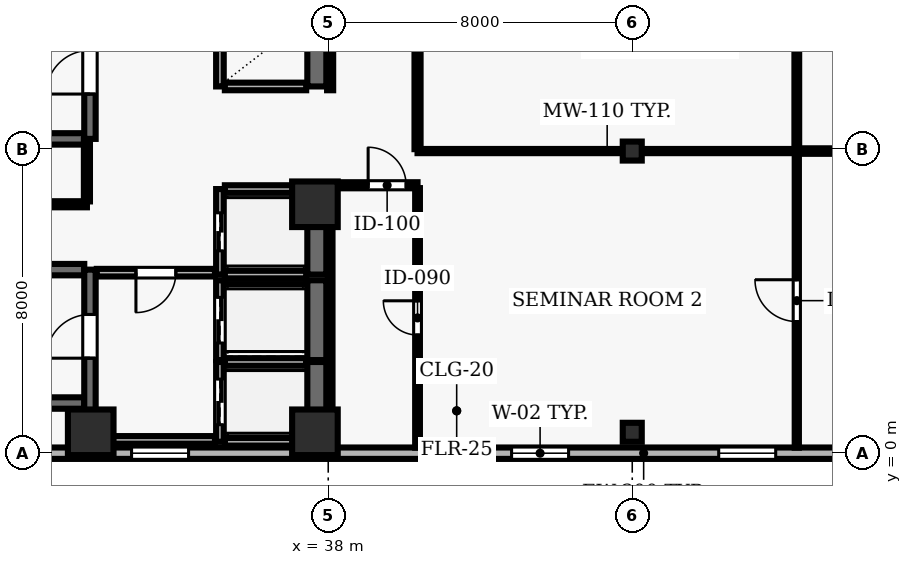
"""IFC4 building model, lengths in metres.
Left out: names, types, materials, properties, quantities, classifications, styles, units other than length and angle.
Written with IfcOpenShell. Run it as: python <this file> out.ifc"""

import sys

from ifc_helpers import new_model, si_unit, direction, frame, frame_2d, origin, origin_2d, place, context, subcontext, project, spatial, rectangle, hollow_rectangle, extrude, element, fill, save


model = new_model("IFC4")
c1 = context("Model", 3, precision=1e-05, world=origin(), true_north=direction((0.0, 1.0)))
c2 = subcontext(c1, "Body", "Model", "MODEL_VIEW")
j1 = project(units=[si_unit("LENGTHUNIT", "METRE"), si_unit("PLANEANGLEUNIT", "RADIAN")], contexts=[c1])
p1 = place(None, origin())
s1 = spatial("IfcSite", under=j1, at=p1, CompositionType="ELEMENT")
p2 = place(p1, origin())
s2 = spatial("IfcBuilding", under=s1, at=p2, CompositionType="ELEMENT")
p3 = place(p2, frame((0.0, 0.0, 107.3)))
s3 = spatial("IfcBuildingStorey", under=s2, at=p3, CompositionType="ELEMENT", Elevation=107.3)
for number, where, z_axis, x_axis in (
    (1, (31.75, 0.55, 0.0), (0.0, 0.0, 1.0), (1.0, 0.0, 0.0)),
    (2, (37.65, 0.55, 0.0), (0.0, 0.0, 1.0), (1.0, 0.0, 0.0)),
    (3, (37.65, 6.55, 0.0), (0.0, 0.0, 1.0), (1.0, 0.0, 0.0)),
):
    element("IfcColumn", number, at=place(p3, frame(where, z_axis=z_axis, x_axis=x_axis)), inside=s3, PredefinedType="COLUMN", context=c2, shape_type="SweptSolid", body=[
        extrude(rectangle(XDim=1.2, YDim=1.2, at=origin_2d()), origin(), (0.0, 0.0, 1.0), 3.9),
    ])
for number, where, z_axis, x_axis in (
    (4, (46.0, 0.55, 0.0), (0.0, 0.0, 1.0), (1.0, 0.0, 0.0)),
    (5, (46.0, 7.95, 0.0), (0.0, 0.0, 1.0), (1.0, 0.0, 0.0)),
):
    element("IfcColumn", number, at=place(p3, frame(where, z_axis=z_axis, x_axis=x_axis)), inside=s3, PredefinedType="COLUMN", context=c2, shape_type="SweptSolid", body=[
        extrude(hollow_rectangle(XDim=0.5, YDim=0.5, WallThickness=0.025, at=origin_2d()), origin(), (0.0, 0.0, 1.0), 3.9),
    ])
p4 = place(p3, frame((24.5, 0.0, 0.0), z_axis=(0.0, 0.0, 1.0), x_axis=(1.0, 0.0, 0.0)))
e6 = element("IfcWall", 6, at=p4, inside=s3, PredefinedType="SOLIDWALL", context=c2, shape_type="SweptSolid", body=[
    extrude(rectangle(XDim=43.6, YDim=0.3, at=frame_2d((21.8, 0.0))), origin(), (0.0, 0.0, 1.0), 3.69),
])
p5 = place(p4, frame((1.975, 0.0, 0.9)))
e7 = element("IfcOpeningElement", 7, at=p5, cuts=e6, PredefinedType="OPENING", context=c2, shape_type="SweptSolid", body=[
    extrude(rectangle(XDim=1.5, YDim=1.6, at=frame_2d((0.75, 0.8))), frame((0.0, 0.16, 0.0), z_axis=(0.0, -1.0, 0.0), x_axis=(1.0, 0.0, 0.0)), (0.0, 0.0, 1.0), 0.32),
])
p6 = place(p4, frame((8.325, 0.0, 0.9)))
e8 = element("IfcOpeningElement", 8, at=p6, cuts=e6, PredefinedType="OPENING", context=c2, shape_type="SweptSolid", body=[
    extrude(rectangle(XDim=1.5, YDim=1.6, at=frame_2d((0.75, 0.8))), frame((0.0, 0.16, 0.0), z_axis=(0.0, -1.0, 0.0), x_axis=(1.0, 0.0, 0.0)), (0.0, 0.0, 1.0), 0.32),
])
p7 = place(p4, frame((18.325, 0.0, 0.9)))
e9 = element("IfcOpeningElement", 9, at=p7, cuts=e6, PredefinedType="OPENING", context=c2, shape_type="SweptSolid", body=[
    extrude(rectangle(XDim=1.5, YDim=1.6, at=frame_2d((0.75, 0.8))), frame((0.0, 0.16, 0.0), z_axis=(0.0, -1.0, 0.0), x_axis=(1.0, 0.0, 0.0)), (0.0, 0.0, 1.0), 0.32),
])
p8 = place(p4, frame((23.775, 0.0, 0.9)))
e10 = element("IfcOpeningElement", 10, at=p8, cuts=e6, PredefinedType="OPENING", context=c2, shape_type="SweptSolid", body=[
    extrude(rectangle(XDim=1.5, YDim=1.6, at=frame_2d((0.75, 0.8))), frame((0.0, 0.16, 0.0), z_axis=(0.0, -1.0, 0.0), x_axis=(1.0, 0.0, 0.0)), (0.0, 0.0, 1.0), 0.32),
])
p9 = place(p4, frame((29.225, 0.0, 0.9)))
e11 = element("IfcOpeningElement", 11, at=p9, cuts=e6, PredefinedType="OPENING", context=c2, shape_type="SweptSolid", body=[
    extrude(rectangle(XDim=1.5, YDim=1.6, at=frame_2d((0.75, 0.8))), frame((0.0, 0.16, 0.0), z_axis=(0.0, -1.0, 0.0), x_axis=(1.0, 0.0, 0.0)), (0.0, 0.0, 1.0), 0.32),
])
p10 = place(p4, frame((40.125, 0.0, 0.9)))
e12 = element("IfcOpeningElement", 12, at=p10, cuts=e6, PredefinedType="OPENING", context=c2, shape_type="SweptSolid", body=[
    extrude(rectangle(XDim=1.5, YDim=1.6, at=frame_2d((0.75, 0.8))), frame((0.0, 0.16, 0.0), z_axis=(0.0, -1.0, 0.0), x_axis=(1.0, 0.0, 0.0)), (0.0, 0.0, 1.0), 0.32),
])
for number, where, z_axis, x_axis in (
    (13, (31.58, 4.83, 0.0), (0.0, 0.0, 1.0), (-1.0, 0.0, 0.0)),
    (14, (23.22, 1.32, 0.0), (0.0, 0.0, 1.0), (1.0, 0.0, 0.0)),
):
    element("IfcWall", number, at=place(p3, frame(where, z_axis=z_axis, x_axis=x_axis)), inside=s3, PredefinedType="SHEAR", context=c2, shape_type="SweptSolid", body=[
        extrude(rectangle(XDim=8.36, YDim=0.3, at=frame_2d((4.18, 0.0))), origin(), (0.0, 0.0, 1.0), 3.69),
    ])
p11 = place(p3, frame((31.73, 0.96, 0.0), z_axis=(0.0, 0.0, 1.0), x_axis=(0.0, 1.0, 0.0)))
e15 = element("IfcWall", 15, at=p11, inside=s3, PredefinedType="SHEAR", context=c2, shape_type="SweptSolid", body=[
    extrude(rectangle(XDim=3.87, YDim=0.3, at=frame_2d((1.935, 0.0))), origin(), (0.0, 0.0, 1.0), 3.69),
])
p12 = place(p11, frame((1.54, 0.0, 0.0)))
e16 = element("IfcOpeningElement", 16, at=p12, cuts=e15, PredefinedType="OPENING", context=c2, shape_type="SweptSolid", body=[
    extrude(rectangle(XDim=1.15, YDim=2.15, at=frame_2d((0.575, 1.075))), frame((0.0, 0.16, 0.0), z_axis=(0.0, -1.0, 0.0), x_axis=(1.0, 0.0, 0.0)), (0.0, 0.0, 1.0), 0.32),
])
p13 = place(p3, frame((23.22, 8.27, 0.0), z_axis=(0.0, 0.0, 1.0), x_axis=(1.0, 0.0, 0.0)))
e17 = element("IfcWall", 17, at=p13, inside=s3, PredefinedType="SHEAR", context=c2, shape_type="SweptSolid", body=[
    extrude(rectangle(XDim=8.36, YDim=0.3, at=frame_2d((4.18, 0.0))), origin(), (0.0, 0.0, 1.0), 3.69),
])
p14 = place(p3, frame((31.73, 8.27, 0.0), z_axis=(0.0, 0.0, 1.0), x_axis=(0.0, 1.0, 0.0)))
e18 = element("IfcWall", 18, at=p14, inside=s3, PredefinedType="SHEAR", context=c2, shape_type="SweptSolid", body=[
    extrude(rectangle(XDim=3.51, YDim=0.3, at=frame_2d((1.755, 0.0))), origin(), (0.0, 0.0, 1.0), 3.69),
])
p15 = place(p14, frame((1.18, 0.0, 0.0)))
e19 = element("IfcOpeningElement", 19, at=p15, cuts=e18, PredefinedType="OPENING", context=c2, shape_type="SweptSolid", body=[
    extrude(rectangle(XDim=1.15, YDim=2.15, at=frame_2d((0.575, 1.075))), frame((0.0, 0.16, 0.0), z_axis=(0.0, -1.0, 0.0), x_axis=(1.0, 0.0, 0.0)), (0.0, 0.0, 1.0), 0.32),
])
p16 = place(p3, frame((35.15, 2.4, 0.0), z_axis=(0.0, 0.0, 1.0), x_axis=(0.0, -1.0, 0.0)))
e20 = element("IfcWall", 20, at=p16, inside=s3, PredefinedType="SOLIDWALL", context=c2, shape_type="SweptSolid", body=[
    extrude(rectangle(XDim=2.1, YDim=0.2, at=frame_2d((1.05, 0.0))), origin(), (0.0, 0.0, 1.0), 3.69),
])
p17 = place(p16, frame((0.45, 0.0, 0.0)))
e21 = element("IfcOpeningElement", 21, at=p17, cuts=e20, PredefinedType="OPENING", context=c2, shape_type="SweptSolid", body=[
    extrude(rectangle(XDim=1.2, YDim=2.15, at=frame_2d((0.6, 1.075))), frame((0.0, 0.11, 0.0), z_axis=(0.0, -1.0, 0.0), x_axis=(1.0, 0.0, 0.0)), (0.0, 0.0, 1.0), 0.22),
])
p18 = place(p3, frame((37.7, 0.3, 0.0), z_axis=(0.0, 0.0, 1.0), x_axis=(0.0, 1.0, 0.0)))
e22 = element("IfcWall", 22, at=p18, inside=s3, PredefinedType="SHEAR", context=c2, shape_type="SweptSolid", body=[
    extrude(rectangle(XDim=2.1, YDim=0.5, at=frame_2d((1.05, 0.0))), origin(), (0.0, 0.0, 1.0), 3.69),
])
for number, where, z_axis, x_axis in (
    (23, (35.28, 0.3, 0.0), (0.0, 0.0, 1.0), (1.0, 0.0, 0.0)),
    (24, (37.42, 2.4, 0.0), (0.0, 0.0, 1.0), (-1.0, 0.0, 0.0)),
):
    element("IfcWall", number, at=place(p3, frame(where, z_axis=z_axis, x_axis=x_axis)), inside=s3, PredefinedType="SOLIDWALL", context=c2, shape_type="SweptSolid", body=[
        extrude(rectangle(XDim=2.14, YDim=0.2, at=frame_2d((1.07, 0.0))), origin(), (0.0, 0.0, 1.0), 3.69),
    ])
p19 = place(p3, frame((35.15, 4.55, 0.0), z_axis=(0.0, 0.0, 1.0), x_axis=(0.0, -1.0, 0.0)))
e25 = element("IfcWall", 25, at=p19, inside=s3, PredefinedType="SOLIDWALL", context=c2, shape_type="SweptSolid", body=[
    extrude(rectangle(XDim=2.1, YDim=0.2, at=frame_2d((1.05, 0.0))), origin(), (0.0, 0.0, 1.0), 3.69),
])
p20 = place(p19, frame((0.45, 0.0, 0.0)))
e26 = element("IfcOpeningElement", 26, at=p20, cuts=e25, PredefinedType="OPENING", context=c2, shape_type="SweptSolid", body=[
    extrude(rectangle(XDim=1.2, YDim=2.15, at=frame_2d((0.6, 1.075))), frame((0.0, 0.11, 0.0), z_axis=(0.0, -1.0, 0.0), x_axis=(1.0, 0.0, 0.0)), (0.0, 0.0, 1.0), 0.22),
])
p21 = place(p3, frame((37.7, 2.45, 0.0), z_axis=(0.0, 0.0, 1.0), x_axis=(0.0, 1.0, 0.0)))
e27 = element("IfcWall", 27, at=p21, inside=s3, PredefinedType="SHEAR", context=c2, shape_type="SweptSolid", body=[
    extrude(rectangle(XDim=2.1, YDim=0.5, at=frame_2d((1.05, 0.0))), origin(), (0.0, 0.0, 1.0), 3.69),
])
p22 = place(p3, frame((37.42, 4.55, 0.0), z_axis=(0.0, 0.0, 1.0), x_axis=(-1.0, 0.0, 0.0)))
e28 = element("IfcWall", 28, at=p22, inside=s3, PredefinedType="SOLIDWALL", context=c2, shape_type="SweptSolid", body=[
    extrude(rectangle(XDim=2.14, YDim=0.2, at=frame_2d((1.07, 0.0))), origin(), (0.0, 0.0, 1.0), 3.69),
])
p23 = place(p3, frame((35.15, 6.95, 0.0), z_axis=(0.0, 0.0, 1.0), x_axis=(0.0, -1.0, 0.0)))
e29 = element("IfcWall", 29, at=p23, inside=s3, PredefinedType="SOLIDWALL", context=c2, shape_type="SweptSolid", body=[
    extrude(rectangle(XDim=2.25, YDim=0.2, at=frame_2d((1.125, 0.0))), origin(), (0.0, 0.0, 1.0), 3.69),
])
p24 = place(p23, frame((0.625, 0.0, 0.0)))
e30 = element("IfcOpeningElement", 30, at=p24, cuts=e29, PredefinedType="OPENING", context=c2, shape_type="SweptSolid", body=[
    extrude(rectangle(XDim=1.0, YDim=2.1, at=frame_2d((0.5, 1.05))), frame((0.0, 0.11, 0.0), z_axis=(0.0, -1.0, 0.0), x_axis=(1.0, 0.0, 0.0)), (0.0, 0.0, 1.0), 0.22),
])
p25 = place(p3, frame((37.7, 4.7, 0.0), z_axis=(0.0, 0.0, 1.0), x_axis=(0.0, 1.0, 0.0)))
e31 = element("IfcWall", 31, at=p25, inside=s3, PredefinedType="SHEAR", context=c2, shape_type="SweptSolid", body=[
    extrude(rectangle(XDim=2.25, YDim=0.5, at=frame_2d((1.125, 0.0))), origin(), (0.0, 0.0, 1.0), 3.69),
])
for number, where, z_axis, x_axis in (
    (32, (35.28, 4.7, 0.0), (0.0, 0.0, 1.0), (1.0, 0.0, 0.0)),
    (33, (37.42, 6.95, 0.0), (0.0, 0.0, 1.0), (-1.0, 0.0, 0.0)),
):
    element("IfcWall", number, at=place(p3, frame(where, z_axis=z_axis, x_axis=x_axis)), inside=s3, PredefinedType="SOLIDWALL", context=c2, shape_type="SweptSolid", body=[
        extrude(rectangle(XDim=2.14, YDim=0.2, at=frame_2d((1.07, 0.0))), origin(), (0.0, 0.0, 1.0), 3.69),
    ])
p26 = place(p3, frame((35.15, 11.55, 0.0), z_axis=(0.0, 0.0, 1.0), x_axis=(0.0, -1.0, 0.0)))
e34 = element("IfcWall", 34, at=p26, inside=s3, PredefinedType="SOLIDWALL", context=c2, shape_type="SweptSolid", body=[
    extrude(rectangle(XDim=1.9, YDim=0.2, at=frame_2d((0.95, 0.0))), origin(), (0.0, 0.0, 1.0), 3.69),
])
p27 = place(p3, frame((37.7, 9.65, 0.0), z_axis=(0.0, 0.0, 1.0), x_axis=(0.0, 1.0, 0.0)))
e35 = element("IfcWall", 35, at=p27, inside=s3, PredefinedType="SHEAR", context=c2, shape_type="SweptSolid", body=[
    extrude(rectangle(XDim=1.9, YDim=0.5, at=frame_2d((0.95, 0.0))), origin(), (0.0, 0.0, 1.0), 3.69),
])
p28 = place(p3, frame((35.28, 9.65, 0.0), z_axis=(0.0, 0.0, 1.0), x_axis=(1.0, 0.0, 0.0)))
e36 = element("IfcWall", 36, at=p28, inside=s3, PredefinedType="SOLIDWALL", context=c2, shape_type="SweptSolid", body=[
    extrude(rectangle(XDim=2.14, YDim=0.2, at=frame_2d((1.07, 0.0))), origin(), (0.0, 0.0, 1.0), 3.69),
])
p29 = place(p3, frame((31.65, 0.35, 0.0), z_axis=(0.0, 0.0, 1.0), x_axis=(1.0, 0.0, 0.0)))
e37 = element("IfcWall", 37, at=p29, inside=s3, PredefinedType="SOLIDWALL", context=c2, shape_type="SweptSolid", body=[
    extrude(rectangle(XDim=3.37, YDim=0.2, at=frame_2d((1.685, 0.0))), origin(), (0.0, 0.0, 1.0), 3.69),
])
p30 = place(p3, frame((31.65, 6.55, 0.0), z_axis=(0.0, 0.0, 1.0), x_axis=(-1.0, 0.0, 0.0)))
e38 = element("IfcWall", 38, at=p30, inside=s3, PredefinedType="PARTITIONING", context=c2, shape_type="SweptSolid", body=[
    extrude(rectangle(XDim=4.75, YDim=0.16, at=frame_2d((2.375, 0.0))), origin(), (0.0, 0.0, 1.0), 3.69),
])
p31 = place(p30, frame((1.935, 0.0, 0.0)))
e39 = element("IfcOpeningElement", 39, at=p31, cuts=e38, PredefinedType="OPENING", context=c2, shape_type="SweptSolid", body=[
    extrude(rectangle(XDim=0.88, YDim=2.1, at=frame_2d((0.44, 1.05))), frame((0.0, 0.09, 0.0), z_axis=(0.0, -1.0, 0.0), x_axis=(1.0, 0.0, 0.0)), (0.0, 0.0, 1.0), 0.18),
])
p32 = place(p3, frame((35.02, 4.75, 0.0), z_axis=(0.0, 0.0, 1.0), x_axis=(-1.0, 0.0, 0.0)))
e40 = element("IfcWall", 40, at=p32, inside=s3, PredefinedType="SOLIDWALL", context=c2, shape_type="SweptSolid", body=[
    extrude(rectangle(XDim=3.11, YDim=0.2, at=frame_2d((1.555, 0.0))), origin(), (0.0, 0.0, 1.0), 3.69),
])
p33 = place(p32, frame((1.03, 0.0, 0.0)))
e41 = element("IfcOpeningElement", 41, at=p33, cuts=e40, PredefinedType="OPENING", context=c2, shape_type="SweptSolid", body=[
    extrude(rectangle(XDim=1.05, YDim=2.15, at=frame_2d((0.525, 1.075))), frame((0.0, 0.11, 0.0), z_axis=(0.0, -1.0, 0.0), x_axis=(1.0, 0.0, 0.0)), (0.0, 0.0, 1.0), 0.22),
])
p34 = place(p3, frame((38.05, 7.05, 0.0), z_axis=(0.0, 0.0, 1.0), x_axis=(1.0, 0.0, 0.0)))
e42 = element("IfcWall", 42, at=p34, inside=s3, PredefinedType="PARTITIONING", context=c2, shape_type="SweptSolid", body=[
    extrude(rectangle(XDim=2.3, YDim=0.16, at=frame_2d((1.15, 0.0))), origin(), (0.0, 0.0, 1.0), 3.69),
])
p35 = place(p34, frame((1.0, 0.0, 0.0)))
e43 = element("IfcOpeningElement", 43, at=p35, cuts=e42, PredefinedType="OPENING", context=c2, shape_type="SweptSolid", body=[
    extrude(rectangle(XDim=1.0, YDim=2.1, at=frame_2d((0.5, 1.05))), frame((0.0, 0.09, 0.0), z_axis=(0.0, -1.0, 0.0), x_axis=(1.0, 0.0, 0.0)), (0.0, 0.0, 1.0), 0.18),
])
p36 = place(p3, frame((50.33, 7.95, 0.0), z_axis=(0.0, 0.0, 1.0), x_axis=(-1.0, 0.0, 0.0)))
e44 = element("IfcWall", 44, at=p36, inside=s3, PredefinedType="MOVABLE", context=c2, shape_type="SweptSolid", body=[
    extrude(rectangle(XDim=9.98, YDim=0.11, at=frame_2d((4.99, 0.0))), origin(), (0.0, 0.0, 1.0), 3.073),
])
p37 = place(p3, frame((60.62, 7.95, 0.0), z_axis=(0.0, 0.0, 1.0), x_axis=(-1.0, 0.0, 0.0)))
e45 = element("IfcWall", 45, at=p37, inside=s3, PredefinedType="PARTITIONING", context=c2, shape_type="SweptSolid", body=[
    extrude(rectangle(XDim=10.29, YDim=0.145, at=frame_2d((5.145, 0.0))), origin(), (0.0, 0.0, 1.0), 3.073),
])
p38 = place(p3, frame((31.65, 8.24, 0.0), z_axis=(0.0, 0.0, 1.0), x_axis=(0.0, -1.0, 0.0)))
e46 = element("IfcWall", 46, at=p38, inside=s3, PredefinedType="PARTITIONING", context=c2, shape_type="SweptSolid", body=[
    extrude(rectangle(XDim=1.615, YDim=0.16, at=frame_2d((0.808, 0.0))), origin(), (0.0, 0.0, 1.0), 3.69),
])
p39 = place(p3, frame((38.05, 6.975, 0.0), z_axis=(0.0, 0.0, 1.0), x_axis=(0.0, -1.0, 0.0)))
e47 = element("IfcWall", 47, at=p39, inside=s3, PredefinedType="PARTITIONING", context=c2, shape_type="SweptSolid", body=[
    extrude(rectangle(XDim=6.83, YDim=0.125, at=frame_2d((3.415, 0.0))), origin(), (0.0, 0.0, 1.0), 3.073),
])
p40 = place(p3, frame((38.05, 15.925, 0.0), z_axis=(0.0, 0.0, 1.0), x_axis=(0.0, -1.0, 0.0)))
e48 = element("IfcWall", 48, at=p40, inside=s3, PredefinedType="PARTITIONING", context=c2, shape_type="SweptSolid", body=[
    extrude(rectangle(XDim=6.375, YDim=0.16, at=frame_2d((3.188, 0.0))), origin(), (0.0, 0.0, 1.0), 3.073),
])
p41 = place(p3, frame((40.35, 0.145, 0.0), z_axis=(0.0, 0.0, 1.0), x_axis=(0.0, 1.0, 0.0)))
e49 = element("IfcWall", 49, at=p41, inside=s3, PredefinedType="PARTITIONING", context=c2, shape_type="SweptSolid", body=[
    extrude(rectangle(XDim=6.83, YDim=0.125, at=frame_2d((3.415, 0.0))), origin(), (0.0, 0.0, 1.0), 3.69),
])
p42 = place(p41, frame((2.965, 0.0, 0.0)))
e50 = element("IfcOpeningElement", 50, at=p42, cuts=e49, PredefinedType="OPENING", context=c2, shape_type="SweptSolid", body=[
    extrude(rectangle(XDim=0.9, YDim=2.1, at=frame_2d((0.45, 1.05))), frame((0.0, 0.073, 0.0), z_axis=(0.0, -1.0, 0.0), x_axis=(1.0, 0.0, 0.0)), (0.0, 0.0, 1.0), 0.145),
])
p43 = place(p3, frame((40.35, 8.0, 0.0), z_axis=(0.0, 0.0, 1.0), x_axis=(0.0, 1.0, 0.0)))
e51 = element("IfcWall", 51, at=p43, inside=s3, PredefinedType="PARTITIONING", context=c2, shape_type="SweptSolid", body=[
    extrude(rectangle(XDim=5.575, YDim=0.16, at=frame_2d((2.788, 0.0))), origin(), (0.0, 0.0, 1.0), 3.69),
])
p44 = place(p3, frame((50.33, 0.145, 0.0), z_axis=(0.0, 0.0, 1.0), x_axis=(0.0, 1.0, 0.0)))
e52 = element("IfcWall", 52, at=p44, inside=s3, PredefinedType="MOVABLE", context=c2, shape_type="SweptSolid", body=[
    extrude(rectangle(XDim=7.738, YDim=0.11, at=frame_2d((3.869, 0.0))), origin(), (0.0, 0.0, 1.0), 3.69),
])
p45 = place(p44, frame((3.319, 0.0, 0.0)))
e53 = element("IfcOpeningElement", 53, at=p45, cuts=e52, PredefinedType="OPENING", context=c2, shape_type="SweptSolid", body=[
    extrude(rectangle(XDim=1.1, YDim=2.15, at=frame_2d((0.55, 1.075))), frame((0.0, 0.065, 0.0), z_axis=(0.0, -1.0, 0.0), x_axis=(1.0, 0.0, 0.0)), (0.0, 0.0, 1.0), 0.13),
])
p46 = place(p3, frame((50.33, 8.018, 0.0), z_axis=(0.0, 0.0, 1.0), x_axis=(0.0, 1.0, 0.0)))
e54 = element("IfcWall", 54, at=p46, inside=s3, PredefinedType="PARTITIONING", context=c2, shape_type="SweptSolid", body=[
    extrude(rectangle(XDim=5.557, YDim=0.125, at=frame_2d((2.778, 0.0))), origin(), (0.0, 0.0, 1.0), 3.69),
])
p47 = place(p6, origin())
e55 = element("IfcWindow", 55, at=p47, inside=s3, PartitioningType="SINGLE_PANEL", PredefinedType="WINDOW", context=c2, shape_type="SweptSolid", body=[
    extrude(rectangle(XDim=1.5, YDim=1.6, at=frame_2d((0.75, 0.8))), frame((0.0, 0.03, 0.0), z_axis=(0.0, -1.0, 0.0), x_axis=(1.0, 0.0, 0.0)), (0.0, 0.0, 1.0), 0.06),
])
fill(e8, e55)
p48 = place(p7, origin())
e56 = element("IfcWindow", 56, at=p48, inside=s3, PartitioningType="SINGLE_PANEL", PredefinedType="WINDOW", context=c2, shape_type="SweptSolid", body=[
    extrude(rectangle(XDim=1.5, YDim=1.6, at=frame_2d((0.75, 0.8))), frame((0.0, 0.03, 0.0), z_axis=(0.0, -1.0, 0.0), x_axis=(1.0, 0.0, 0.0)), (0.0, 0.0, 1.0), 0.06),
])
fill(e9, e56)
p49 = place(p8, origin())
e57 = element("IfcWindow", 57, at=p49, inside=s3, PartitioningType="SINGLE_PANEL", PredefinedType="WINDOW", context=c2, shape_type="SweptSolid", body=[
    extrude(rectangle(XDim=1.5, YDim=1.6, at=frame_2d((0.75, 0.8))), frame((0.0, 0.03, 0.0), z_axis=(0.0, -1.0, 0.0), x_axis=(1.0, 0.0, 0.0)), (0.0, 0.0, 1.0), 0.06),
])
fill(e10, e57)
p50 = place(p12, origin())
e58 = element("IfcDoor", 58, at=p50, inside=s3, OperationType="SINGLE_SWING_LEFT", PredefinedType="DOOR", context=c2, shape_type="SweptSolid", body=[
    extrude(rectangle(XDim=1.15, YDim=2.15, at=frame_2d((0.575, 1.075))), frame((0.0, 0.025, 0.0), z_axis=(0.0, -1.0, 0.0), x_axis=(1.0, 0.0, 0.0)), (0.0, 0.0, 1.0), 0.05),
])
fill(e16, e58)
p51 = place(p15, origin())
e59 = element("IfcDoor", 59, at=p51, inside=s3, OperationType="SINGLE_SWING_LEFT", PredefinedType="DOOR", context=c2, shape_type="SweptSolid", body=[
    extrude(rectangle(XDim=1.15, YDim=2.15, at=frame_2d((0.575, 1.075))), frame((0.0, 0.025, 0.0), z_axis=(0.0, -1.0, 0.0), x_axis=(1.0, 0.0, 0.0)), (0.0, 0.0, 1.0), 0.05),
])
fill(e19, e59)
p52 = place(p17, origin())
e60 = element("IfcDoor", 60, at=p52, inside=s3, OperationType="DOUBLE_DOOR_SLIDING", PredefinedType="DOOR", context=c2, shape_type="SweptSolid", body=[
    extrude(rectangle(XDim=1.2, YDim=2.15, at=frame_2d((0.6, 1.075))), frame((0.0, 0.025, 0.0), z_axis=(0.0, -1.0, 0.0), x_axis=(1.0, 0.0, 0.0)), (0.0, 0.0, 1.0), 0.05),
])
fill(e21, e60)
p53 = place(p20, origin())
e61 = element("IfcDoor", 61, at=p53, inside=s3, OperationType="DOUBLE_DOOR_SLIDING", PredefinedType="DOOR", context=c2, shape_type="SweptSolid", body=[
    extrude(rectangle(XDim=1.2, YDim=2.15, at=frame_2d((0.6, 1.075))), frame((0.0, 0.025, 0.0), z_axis=(0.0, -1.0, 0.0), x_axis=(1.0, 0.0, 0.0)), (0.0, 0.0, 1.0), 0.05),
])
fill(e26, e61)
p54 = place(p24, origin())
e62 = element("IfcDoor", 62, at=p54, inside=s3, OperationType="DOUBLE_DOOR_SLIDING", PredefinedType="DOOR", context=c2, shape_type="SweptSolid", body=[
    extrude(rectangle(XDim=1.0, YDim=2.1, at=frame_2d((0.5, 1.05))), frame((0.0, 0.025, 0.0), z_axis=(0.0, -1.0, 0.0), x_axis=(1.0, 0.0, 0.0)), (0.0, 0.0, 1.0), 0.05),
])
fill(e30, e62)
p55 = place(p33, origin())
e63 = element("IfcDoor", 63, at=p55, inside=s3, OperationType="SINGLE_SWING_RIGHT", PredefinedType="DOOR", context=c2, shape_type="SweptSolid", body=[
    extrude(rectangle(XDim=1.05, YDim=2.15, at=frame_2d((0.525, 1.075))), frame((0.0, 0.025, 0.0), z_axis=(0.0, -1.0, 0.0), x_axis=(1.0, 0.0, 0.0)), (0.0, 0.0, 1.0), 0.05),
])
fill(e41, e63)
p56 = place(p35, origin())
e64 = element("IfcDoor", 64, at=p56, inside=s3, OperationType="SINGLE_SWING_LEFT", PredefinedType="DOOR", context=c2, shape_type="SweptSolid", body=[
    extrude(rectangle(XDim=1.0, YDim=2.1, at=frame_2d((0.5, 1.05))), frame((0.0, 0.025, 0.0), z_axis=(0.0, -1.0, 0.0), x_axis=(1.0, 0.0, 0.0)), (0.0, 0.0, 1.0), 0.05),
])
fill(e43, e64)
p57 = place(p42, origin())
e65 = element("IfcDoor", 65, at=p57, inside=s3, OperationType="SINGLE_SWING_RIGHT", PredefinedType="DOOR", context=c2, shape_type="SweptSolid", body=[
    extrude(rectangle(XDim=0.9, YDim=2.1, at=frame_2d((0.45, 1.05))), frame((0.0, 0.025, 0.0), z_axis=(0.0, -1.0, 0.0), x_axis=(1.0, 0.0, 0.0)), (0.0, 0.0, 1.0), 0.05),
])
fill(e50, e65)
p58 = place(p45, origin())
e66 = element("IfcDoor", 66, at=p58, inside=s3, OperationType="SINGLE_SWING_RIGHT", PredefinedType="DOOR", context=c2, shape_type="SweptSolid", body=[
    extrude(rectangle(XDim=1.1, YDim=2.15, at=frame_2d((0.55, 1.075))), frame((0.0, 0.025, 0.0), z_axis=(0.0, -1.0, 0.0), x_axis=(1.0, 0.0, 0.0)), (0.0, 0.0, 1.0), 0.05),
])
fill(e53, e66)
save(model, sys.argv[1])
